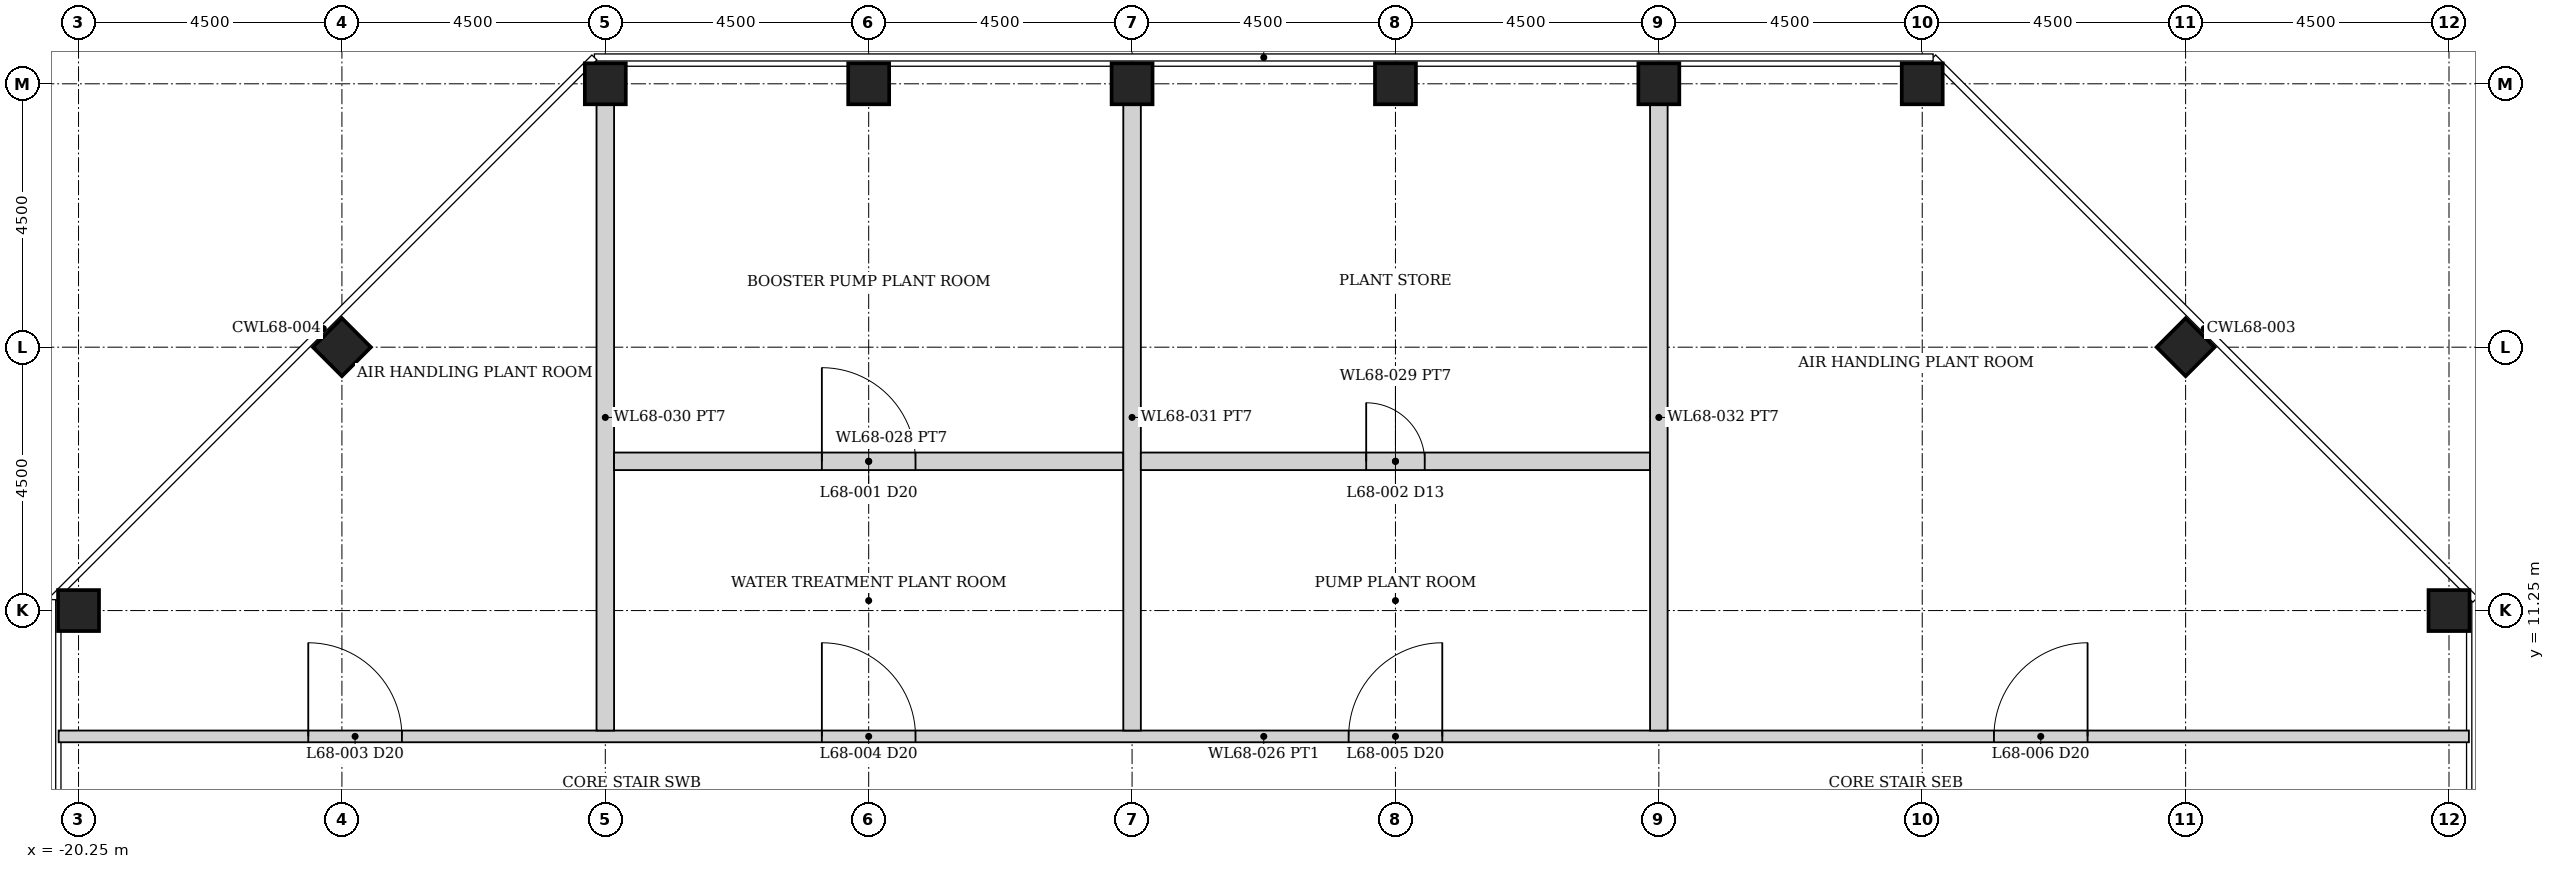
"""IFC4 building model, lengths in metres.
Left out: names, types, materials, properties, quantities, classifications, styles, units other than length and angle.
Written with IfcOpenShell. Run it as: python <this file> out.ifc"""

import sys

from ifc_helpers import new_model, si_unit, direction, frame, frame_2d, origin, origin_2d, place, context, subcontext, project, spatial, rectangle, hollow_rectangle, extrude, element, fill, save


model = new_model("IFC4")
c1 = context("Model", 3, precision=1e-05, world=origin(), true_north=direction((0.0, 1.0)))
c2 = subcontext(c1, "Body", "Model", "MODEL_VIEW")
j1 = project(units=[si_unit("LENGTHUNIT", "METRE"), si_unit("PLANEANGLEUNIT", "RADIAN")], contexts=[c1])
p1 = place(None, origin())
s1 = spatial("IfcSite", under=j1, at=p1, CompositionType="ELEMENT")
p2 = place(p1, origin())
s2 = spatial("IfcBuilding", under=s1, at=p2, CompositionType="ELEMENT")
p3 = place(p2, frame((0.0, 0.0, 262.05)))
s3 = spatial("IfcBuildingStorey", under=s2, at=p3, CompositionType="ELEMENT", Elevation=262.05)
for number, where, z_axis, x_axis in (
    (1, (-11.25, 20.25, 0.0), (0.0, 0.0, 1.0), (0.0, 1.0, 0.0)),
    (2, (-6.75, 20.25, 0.0), (0.0, 0.0, 1.0), (0.0, 1.0, 0.0)),
    (3, (-2.25, 20.25, 0.0), (0.0, 0.0, 1.0), (0.0, 1.0, 0.0)),
    (4, (2.25, 20.25, 0.0), (0.0, 0.0, 1.0), (0.0, 1.0, 0.0)),
    (5, (6.75, 20.25, 0.0), (0.0, 0.0, 1.0), (0.0, 1.0, 0.0)),
    (6, (11.25, 20.25, 0.0), (0.0, 0.0, 1.0), (0.0, 1.0, 0.0)),
    (7, (20.25, 11.25, 0.0), (0.0, 0.0, 1.0), (1.0, 0.0, 0.0)),
    (8, (-20.25, 11.25, 0.0), (0.0, 0.0, 1.0), (1.0, 0.0, 0.0)),
    (9, (15.75, 15.75, 0.0), (0.0, 0.0, 1.0), (0.707, 0.707, 0.0)),
    (10, (-15.75, 15.75, 0.0), (0.0, 0.0, 1.0), (0.707, -0.707, 0.0)),
):
    element("IfcColumn", number, at=place(p3, frame(where, z_axis=z_axis, x_axis=x_axis)), inside=s3, PredefinedType="COLUMN", context=c2, shape_type="SweptSolid", body=[
        extrude(hollow_rectangle(XDim=0.7, YDim=0.7, WallThickness=0.035, at=origin_2d()), origin(), (0.0, 0.0, 1.0), 6.0),
    ])
p4 = place(p3, frame((-20.59, 9.1, 0.0), z_axis=(0.0, 0.0, 1.0), x_axis=(1.0, 0.0, 0.0)))
e11 = element("IfcWall", 11, at=p4, inside=s3, PredefinedType="PARTITIONING", context=c2, shape_type="SweptSolid", body=[
    extrude(rectangle(XDim=41.18, YDim=0.2, at=frame_2d((20.59, 0.0))), origin(), (0.0, 0.0, 1.0), 4.823),
])
p5 = place(p4, frame((4.265, 0.0, 0.0)))
e12 = element("IfcOpeningElement", 12, at=p5, cuts=e11, PredefinedType="OPENING", context=c2, shape_type="SweptSolid", body=[
    extrude(rectangle(XDim=1.6, YDim=2.4, at=frame_2d((0.8, 1.2))), frame((0.0, 0.11, 0.0), z_axis=(0.0, -1.0, 0.0), x_axis=(1.0, 0.0, 0.0)), (0.0, 0.0, 1.0), 0.22),
])
p6 = place(p4, frame((13.04, 0.0, 0.0)))
e13 = element("IfcOpeningElement", 13, at=p6, cuts=e11, PredefinedType="OPENING", context=c2, shape_type="SweptSolid", body=[
    extrude(rectangle(XDim=1.6, YDim=2.4, at=frame_2d((0.8, 1.2))), frame((0.0, 0.11, 0.0), z_axis=(0.0, -1.0, 0.0), x_axis=(1.0, 0.0, 0.0)), (0.0, 0.0, 1.0), 0.22),
])
p7 = place(p4, frame((22.04, 0.0, 0.0)))
e14 = element("IfcOpeningElement", 14, at=p7, cuts=e11, PredefinedType="OPENING", context=c2, shape_type="SweptSolid", body=[
    extrude(rectangle(XDim=1.6, YDim=2.4, at=frame_2d((0.8, 1.2))), frame((0.0, 0.11, 0.0), z_axis=(0.0, -1.0, 0.0), x_axis=(1.0, 0.0, 0.0)), (0.0, 0.0, 1.0), 0.22),
])
p8 = place(p4, frame((33.065, 0.0, 0.0)))
e15 = element("IfcOpeningElement", 15, at=p8, cuts=e11, PredefinedType="OPENING", context=c2, shape_type="SweptSolid", body=[
    extrude(rectangle(XDim=1.6, YDim=2.4, at=frame_2d((0.8, 1.2))), frame((0.0, 0.11, 0.0), z_axis=(0.0, -1.0, 0.0), x_axis=(1.0, 0.0, 0.0)), (0.0, 0.0, 1.0), 0.22),
])
p9 = place(p3, frame((-11.25, 9.2, 0.0), z_axis=(0.0, 0.0, 1.0), x_axis=(0.0, 1.0, 0.0)))
e16 = element("IfcWall", 16, at=p9, inside=s3, PredefinedType="PARTITIONING", context=c2, shape_type="SweptSolid", body=[
    extrude(rectangle(XDim=10.7, YDim=0.3, at=frame_2d((5.35, 0.0))), origin(), (0.0, 0.0, 1.0), 4.823),
])
p10 = place(p3, frame((-11.1, 13.8, 0.0), z_axis=(0.0, 0.0, 1.0), x_axis=(1.0, 0.0, 0.0)))
e17 = element("IfcWall", 17, at=p10, inside=s3, PredefinedType="PARTITIONING", context=c2, shape_type="SweptSolid", body=[
    extrude(rectangle(XDim=8.7, YDim=0.3, at=frame_2d((4.35, 0.0))), origin(), (0.0, 0.0, 1.0), 4.823),
])
p11 = place(p10, frame((3.55, 0.0, 0.0)))
e18 = element("IfcOpeningElement", 18, at=p11, cuts=e17, PredefinedType="OPENING", context=c2, shape_type="SweptSolid", body=[
    extrude(rectangle(XDim=1.6, YDim=2.4, at=frame_2d((0.8, 1.2))), frame((0.0, 0.16, 0.0), z_axis=(0.0, -1.0, 0.0), x_axis=(1.0, 0.0, 0.0)), (0.0, 0.0, 1.0), 0.32),
])
p12 = place(p3, frame((-2.25, 9.2, 0.0), z_axis=(0.0, 0.0, 1.0), x_axis=(0.0, 1.0, 0.0)))
e19 = element("IfcWall", 19, at=p12, inside=s3, PredefinedType="PARTITIONING", context=c2, shape_type="SweptSolid", body=[
    extrude(rectangle(XDim=10.7, YDim=0.3, at=frame_2d((5.35, 0.0))), origin(), (0.0, 0.0, 1.0), 4.823),
])
p13 = place(p3, frame((-2.1, 13.8, 0.0), z_axis=(0.0, 0.0, 1.0), x_axis=(1.0, 0.0, 0.0)))
e20 = element("IfcWall", 20, at=p13, inside=s3, PredefinedType="PARTITIONING", context=c2, shape_type="SweptSolid", body=[
    extrude(rectangle(XDim=8.7, YDim=0.3, at=frame_2d((4.35, 0.0))), origin(), (0.0, 0.0, 1.0), 4.823),
])
p14 = place(p13, frame((3.85, 0.0, 0.0)))
e21 = element("IfcOpeningElement", 21, at=p14, cuts=e20, PredefinedType="OPENING", context=c2, shape_type="SweptSolid", body=[
    extrude(rectangle(XDim=1.0, YDim=2.1, at=frame_2d((0.5, 1.05))), frame((0.0, 0.16, 0.0), z_axis=(0.0, -1.0, 0.0), x_axis=(1.0, 0.0, 0.0)), (0.0, 0.0, 1.0), 0.32),
])
p15 = place(p3, frame((6.75, 9.2, 0.0), z_axis=(0.0, 0.0, 1.0), x_axis=(0.0, 1.0, 0.0)))
e22 = element("IfcWall", 22, at=p15, inside=s3, PredefinedType="PARTITIONING", context=c2, shape_type="SweptSolid", body=[
    extrude(rectangle(XDim=10.7, YDim=0.3, at=frame_2d((5.35, 0.0))), origin(), (0.0, 0.0, 1.0), 4.823),
])
p16 = place(p5, origin())
e23 = element("IfcDoor", 23, at=p16, inside=s3, OperationType="SINGLE_SWING_LEFT", PredefinedType="DOOR", context=c2, shape_type="SweptSolid", body=[
    extrude(rectangle(XDim=1.6, YDim=2.4, at=frame_2d((0.8, 1.2))), frame((0.0, 0.025, 0.0), z_axis=(0.0, -1.0, 0.0), x_axis=(1.0, 0.0, 0.0)), (0.0, 0.0, 1.0), 0.05),
])
fill(e12, e23)
p17 = place(p6, origin())
e24 = element("IfcDoor", 24, at=p17, inside=s3, OperationType="SINGLE_SWING_LEFT", PredefinedType="DOOR", context=c2, shape_type="SweptSolid", body=[
    extrude(rectangle(XDim=1.6, YDim=2.4, at=frame_2d((0.8, 1.2))), frame((0.0, 0.025, 0.0), z_axis=(0.0, -1.0, 0.0), x_axis=(1.0, 0.0, 0.0)), (0.0, 0.0, 1.0), 0.05),
])
fill(e13, e24)
p18 = place(p11, origin())
e25 = element("IfcDoor", 25, at=p18, inside=s3, OperationType="SINGLE_SWING_LEFT", PredefinedType="DOOR", context=c2, shape_type="SweptSolid", body=[
    extrude(rectangle(XDim=1.6, YDim=2.4, at=frame_2d((0.8, 1.2))), frame((0.0, 0.025, 0.0), z_axis=(0.0, -1.0, 0.0), x_axis=(1.0, 0.0, 0.0)), (0.0, 0.0, 1.0), 0.05),
])
fill(e18, e25)
p19 = place(p7, origin())
e26 = element("IfcDoor", 26, at=p19, inside=s3, OperationType="SINGLE_SWING_RIGHT", PredefinedType="DOOR", context=c2, shape_type="SweptSolid", body=[
    extrude(rectangle(XDim=1.6, YDim=2.4, at=frame_2d((0.8, 1.2))), frame((0.0, 0.025, 0.0), z_axis=(0.0, -1.0, 0.0), x_axis=(1.0, 0.0, 0.0)), (0.0, 0.0, 1.0), 0.05),
])
fill(e14, e26)
p20 = place(p14, origin())
e27 = element("IfcDoor", 27, at=p20, inside=s3, OperationType="SINGLE_SWING_LEFT", PredefinedType="DOOR", context=c2, shape_type="SweptSolid", body=[
    extrude(rectangle(XDim=1.0, YDim=2.1, at=frame_2d((0.5, 1.05))), frame((0.0, 0.025, 0.0), z_axis=(0.0, -1.0, 0.0), x_axis=(1.0, 0.0, 0.0)), (0.0, 0.0, 1.0), 0.05),
])
fill(e21, e27)
p21 = place(p8, origin())
e28 = element("IfcDoor", 28, at=p21, inside=s3, OperationType="SINGLE_SWING_RIGHT", PredefinedType="DOOR", context=c2, shape_type="SweptSolid", body=[
    extrude(rectangle(XDim=1.6, YDim=2.4, at=frame_2d((0.8, 1.2))), frame((0.0, 0.025, 0.0), z_axis=(0.0, -1.0, 0.0), x_axis=(1.0, 0.0, 0.0)), (0.0, 0.0, 1.0), 0.05),
])
fill(e15, e28)
save(model, sys.argv[1])
